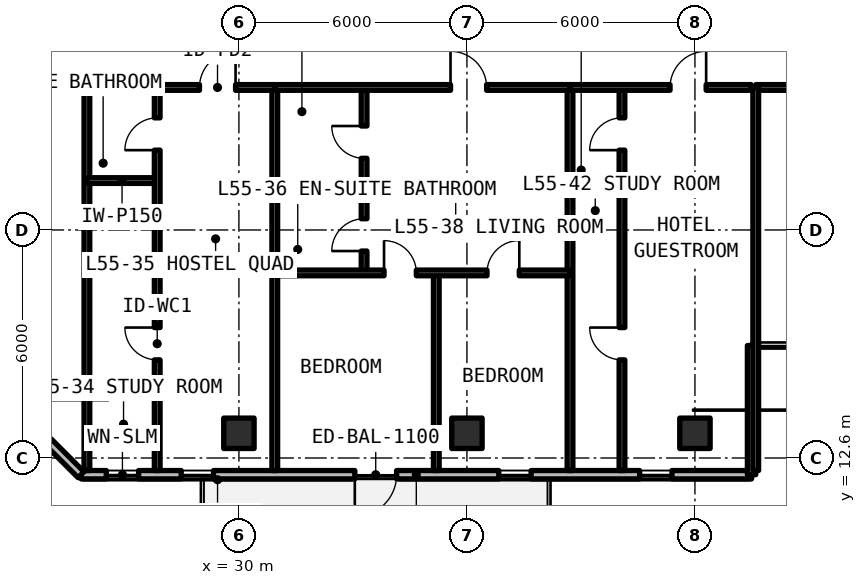
"""IFC4 building model, lengths in metres.
Left out: names, types, materials, properties, quantities, classifications, styles, units other than length and angle.
Written with IfcOpenShell. Run it as: python <this file> out.ifc"""

import sys

from ifc_helpers import new_model, si_unit, direction, frame, frame_2d, origin, origin_2d, place, context, subcontext, project, spatial, rectangle, extrude, element, fill, save


model = new_model("IFC4")
c1 = context("Model", 3, precision=1e-05, world=origin(), true_north=direction((0.0, 1.0)))
c2 = subcontext(c1, "Body", "Model", "MODEL_VIEW")
j1 = project(units=[si_unit("LENGTHUNIT", "METRE"), si_unit("PLANEANGLEUNIT", "RADIAN")], contexts=[c1])
p1 = place(None, origin())
s1 = spatial("IfcSite", under=j1, at=p1, CompositionType="ELEMENT")
p2 = place(p1, origin())
s2 = spatial("IfcBuilding", under=s1, at=p2, CompositionType="ELEMENT")
p3 = place(p2, frame((0.0, 0.0, 198.33)))
s3 = spatial("IfcBuildingStorey", under=s2, at=p3, CompositionType="ELEMENT", Elevation=198.33)
for number, where, z_axis, x_axis in (
    (1, (30.0, 13.25, 0.0), (0.0, 0.0, 1.0), (1.0, 0.0, 0.0)),
    (2, (36.0, 13.25, 0.0), (0.0, 0.0, 1.0), (1.0, 0.0, 0.0)),
    (3, (42.0, 13.25, 0.0), (0.0, 0.0, 1.0), (1.0, 0.0, 0.0)),
):
    element("IfcColumn", number, at=place(p3, frame(where, z_axis=z_axis, x_axis=x_axis)), inside=s3, PredefinedType="COLUMN", context=c2, shape_type="SweptSolid", body=[
        extrude(rectangle(XDim=0.8, YDim=0.8, at=origin_2d()), origin(), (0.0, 0.0, 1.0), 3.3),
    ])
p4 = place(p3, frame((25.846, 12.16, 0.0), z_axis=(0.0, 0.0, 1.0), x_axis=(1.0, 0.0, 0.0)))
e4 = element("IfcWall", 4, at=p4, inside=s3, PredefinedType="SOLIDWALL", context=c2, shape_type="SweptSolid", body=[
    extrude(rectangle(XDim=17.644, YDim=0.22, at=frame_2d((8.822, 0.0))), origin(), (0.0, 0.0, 1.0), 3.08),
])
p5 = place(p4, frame((7.204, 0.0, 0.0)))
e5 = element("IfcOpeningElement", 5, at=p5, cuts=e4, PredefinedType="OPENING", context=c2, shape_type="SweptSolid", body=[
    extrude(rectangle(XDim=1.1, YDim=2.15, at=frame_2d((0.55, 1.075))), frame((0.0, 0.12, 0.0), z_axis=(0.0, -1.0, 0.0), x_axis=(1.0, 0.0, 0.0)), (0.0, 0.0, 1.0), 0.24),
])
p6 = place(p4, frame((0.664, 0.0, 0.78)))
e6 = element("IfcOpeningElement", 6, at=p6, cuts=e4, PredefinedType="OPENING", context=c2, shape_type="SweptSolid", body=[
    extrude(rectangle(XDim=0.85, YDim=1.65, at=frame_2d((0.425, 0.825))), frame((0.0, 0.12, 0.0), z_axis=(0.0, -1.0, 0.0), x_axis=(1.0, 0.0, 0.0)), (0.0, 0.0, 1.0), 0.24),
])
p7 = place(p4, frame((2.636, 0.0, 0.78)))
e7 = element("IfcOpeningElement", 7, at=p7, cuts=e4, PredefinedType="OPENING", context=c2, shape_type="SweptSolid", body=[
    extrude(rectangle(XDim=0.85, YDim=1.65, at=frame_2d((0.425, 0.825))), frame((0.0, 0.12, 0.0), z_axis=(0.0, -1.0, 0.0), x_axis=(1.0, 0.0, 0.0)), (0.0, 0.0, 1.0), 0.24),
])
p8 = place(p4, frame((10.993, 0.0, 0.78)))
e8 = element("IfcOpeningElement", 8, at=p8, cuts=e4, PredefinedType="OPENING", context=c2, shape_type="SweptSolid", body=[
    extrude(rectangle(XDim=0.85, YDim=1.65, at=frame_2d((0.425, 0.825))), frame((0.0, 0.12, 0.0), z_axis=(0.0, -1.0, 0.0), x_axis=(1.0, 0.0, 0.0)), (0.0, 0.0, 1.0), 0.24),
])
p9 = place(p4, frame((14.699, 0.0, 0.78)))
e9 = element("IfcOpeningElement", 9, at=p9, cuts=e4, PredefinedType="OPENING", context=c2, shape_type="SweptSolid", body=[
    extrude(rectangle(XDim=0.85, YDim=1.65, at=frame_2d((0.425, 0.825))), frame((0.0, 0.12, 0.0), z_axis=(0.0, -1.0, 0.0), x_axis=(1.0, 0.0, 0.0)), (0.0, 0.0, 1.0), 0.24),
])
p10 = place(p3, frame((43.49, 12.16, 0.0), z_axis=(0.0, 0.0, 1.0), x_axis=(0.0, 1.0, 0.0)))
e10 = element("IfcWall", 10, at=p10, inside=s3, PredefinedType="SOLIDWALL", context=c2, shape_type="SweptSolid", body=[
    extrude(rectangle(XDim=3.4, YDim=0.22, at=frame_2d((1.7, 0.0))), origin(), (0.0, 0.0, 1.0), 3.08),
])
p11 = place(p3, frame((21.71, 16.296, 0.0), z_axis=(0.0, 0.0, 1.0), x_axis=(0.707106781187, -0.707106781187, 0.0)))
e11 = element("IfcWall", 11, at=p11, inside=s3, PredefinedType="SOLIDWALL", context=c2, shape_type="SweptSolid", body=[
    extrude(rectangle(XDim=5.849, YDim=0.22, at=frame_2d((2.924, 0.0))), origin(), (0.0, 0.0, 1.0), 3.08),
])
p12 = place(p11, frame((1.224, 0.0, 0.78)))
e12 = element("IfcOpeningElement", 12, at=p12, cuts=e11, PredefinedType="OPENING", context=c2, shape_type="SweptSolid", body=[
    extrude(rectangle(XDim=3.4, YDim=1.66, at=frame_2d((1.7, 0.83))), frame((0.0, 0.12, 0.0), z_axis=(0.0, -1.0, 0.0), x_axis=(1.0, 0.0, 0.0)), (0.0, 0.0, 1.0), 0.24),
])
p13 = place(p3, frame((43.6, 22.35, 0.0), z_axis=(0.0, 0.0, 1.0), x_axis=(1.0, 0.0, 0.0)))
e13 = element("IfcWall", 13, at=p13, inside=s3, PredefinedType="SOLIDWALL", context=c2, shape_type="SweptSolid", body=[
    extrude(rectangle(XDim=8.4, YDim=0.15, at=frame_2d((4.2, 0.0))), origin(), (0.0, 0.0, 1.0), 2.35),
])
p14 = place(p13, frame((3.65, 0.0, 0.0)))
e14 = element("IfcOpeningElement", 14, at=p14, cuts=e13, PredefinedType="OPENING", context=c2, shape_type="SweptSolid", body=[
    extrude(rectangle(XDim=1.1, YDim=2.15, at=frame_2d((0.55, 1.075))), frame((0.0, 0.085, 0.0), z_axis=(0.0, -1.0, 0.0), x_axis=(1.0, 0.0, 0.0)), (0.0, 0.0, 1.0), 0.17),
])
for number, where, z_axis, x_axis in (
    (15, (43.6, 12.27, 0.0), (0.0, 0.0, 1.0), (0.0, 1.0, 0.0)),
    (16, (26.0, 12.27, 0.0), (0.0, 0.0, 1.0), (0.0, 1.0, 0.0)),
    (17, (30.944, 12.27, 0.0), (0.0, 0.0, 1.0), (0.0, 1.0, 0.0)),
):
    element("IfcWall", number, at=place(p3, frame(where, z_axis=z_axis, x_axis=x_axis)), inside=s3, PredefinedType="SOLIDWALL", context=c2, shape_type="SweptSolid", body=[
        extrude(rectangle(XDim=10.08, YDim=0.15, at=frame_2d((5.04, 0.0))), origin(), (0.0, 0.0, 1.0), 2.35),
    ])
p15 = place(p3, frame((26.0, 19.9, 0.0), z_axis=(0.0, 0.0, 1.0), x_axis=(1.0, 0.0, 0.0)))
e18 = element("IfcWall", 18, at=p15, inside=s3, PredefinedType="PARTITIONING", context=c2, shape_type="SweptSolid", body=[
    extrude(rectangle(XDim=1.85, YDim=0.15, at=frame_2d((0.925, 0.0))), origin(), (0.0, 0.0, 1.0), 2.35),
])
p16 = place(p3, frame((27.85, 12.27, 0.0), z_axis=(0.0, 0.0, 1.0), x_axis=(0.0, 1.0, 0.0)))
e19 = element("IfcWall", 19, at=p16, inside=s3, PredefinedType="PARTITIONING", context=c2, shape_type="SweptSolid", body=[
    extrude(rectangle(XDim=10.08, YDim=0.15, at=frame_2d((5.04, 0.0))), origin(), (0.0, 0.0, 1.0), 2.35),
])
p17 = place(p16, frame((2.912, 0.0, 0.0)))
e20 = element("IfcOpeningElement", 20, at=p17, cuts=e19, PredefinedType="OPENING", context=c2, shape_type="SweptSolid", body=[
    extrude(rectangle(XDim=0.85, YDim=2.1, at=frame_2d((0.425, 1.05))), frame((0.0, 0.085, 0.0), z_axis=(0.0, -1.0, 0.0), x_axis=(1.0, 0.0, 0.0)), (0.0, 0.0, 1.0), 0.17),
])
p18 = place(p16, frame((8.43, 0.0, 0.0)))
e21 = element("IfcOpeningElement", 21, at=p18, cuts=e19, PredefinedType="OPENING", context=c2, shape_type="SweptSolid", body=[
    extrude(rectangle(XDim=0.85, YDim=2.1, at=frame_2d((0.425, 1.05))), frame((0.0, 0.085, 0.0), z_axis=(0.0, -1.0, 0.0), x_axis=(1.0, 0.0, 0.0)), (0.0, 0.0, 1.0), 0.17),
])
p19 = place(p3, frame((26.0, 22.35, 0.0), z_axis=(0.0, 0.0, 1.0), x_axis=(1.0, 0.0, 0.0)))
e22 = element("IfcWall", 22, at=p19, inside=s3, PredefinedType="SOLIDWALL", context=c2, shape_type="SweptSolid", body=[
    extrude(rectangle(XDim=4.944, YDim=0.15, at=frame_2d((2.472, 0.0))), origin(), (0.0, 0.0, 1.0), 2.35),
])
p20 = place(p19, frame((2.962, 0.0, 0.0)))
e23 = element("IfcOpeningElement", 23, at=p20, cuts=e22, PredefinedType="OPENING", context=c2, shape_type="SweptSolid", body=[
    extrude(rectangle(XDim=0.95, YDim=2.15, at=frame_2d((0.475, 1.075))), frame((0.0, 0.085, 0.0), z_axis=(0.0, -1.0, 0.0), x_axis=(1.0, 0.0, 0.0)), (0.0, 0.0, 1.0), 0.17),
])
p21 = place(p3, frame((38.713, 12.27, 0.0), z_axis=(0.0, 0.0, 1.0), x_axis=(0.0, 1.0, 0.0)))
e24 = element("IfcWall", 24, at=p21, inside=s3, PredefinedType="SOLIDWALL", context=c2, shape_type="SweptSolid", body=[
    extrude(rectangle(XDim=10.08, YDim=0.15, at=frame_2d((5.04, 0.0))), origin(), (0.0, 0.0, 1.0), 2.35),
])
p22 = place(p3, frame((30.944, 19.471, 0.0), z_axis=(0.0, 0.0, 1.0), x_axis=(1.0, 0.0, 0.0)))
e25 = element("IfcWall", 25, at=p22, inside=s3, PredefinedType="PARTITIONING", context=c2, shape_type="SweptSolid", body=[
    extrude(rectangle(XDim=2.35, YDim=0.15, at=frame_2d((1.175, 0.0))), origin(), (0.0, 0.0, 1.0), 2.35),
])
p23 = place(p3, frame((33.294, 17.47, 0.0), z_axis=(0.0, 0.0, 1.0), x_axis=(0.0, 1.0, 0.0)))
e26 = element("IfcWall", 26, at=p23, inside=s3, PredefinedType="PARTITIONING", context=c2, shape_type="SweptSolid", body=[
    extrude(rectangle(XDim=4.88, YDim=0.15, at=frame_2d((2.44, 0.0))), origin(), (0.0, 0.0, 1.0), 2.35),
])
p24 = place(p23, frame((0.575, 0.0, 0.0)))
e27 = element("IfcOpeningElement", 27, at=p24, cuts=e26, PredefinedType="OPENING", context=c2, shape_type="SweptSolid", body=[
    extrude(rectangle(XDim=0.85, YDim=2.1, at=frame_2d((0.425, 1.05))), frame((0.0, 0.085, 0.0), z_axis=(0.0, -1.0, 0.0), x_axis=(1.0, 0.0, 0.0)), (0.0, 0.0, 1.0), 0.17),
])
p25 = place(p23, frame((3.015, 0.0, 0.0)))
e28 = element("IfcOpeningElement", 28, at=p25, cuts=e26, PredefinedType="OPENING", context=c2, shape_type="SweptSolid", body=[
    extrude(rectangle(XDim=0.85, YDim=2.1, at=frame_2d((0.425, 1.05))), frame((0.0, 0.085, 0.0), z_axis=(0.0, -1.0, 0.0), x_axis=(1.0, 0.0, 0.0)), (0.0, 0.0, 1.0), 0.17),
])
p26 = place(p3, frame((35.194, 12.27, 0.0), z_axis=(0.0, 0.0, 1.0), x_axis=(0.0, 1.0, 0.0)))
e29 = element("IfcWall", 29, at=p26, inside=s3, PredefinedType="PARTITIONING", context=c2, shape_type="SweptSolid", body=[
    extrude(rectangle(XDim=5.2, YDim=0.15, at=frame_2d((2.6, 0.0))), origin(), (0.0, 0.0, 1.0), 2.35),
])
p27 = place(p3, frame((30.944, 17.47, 0.0), z_axis=(0.0, 0.0, 1.0), x_axis=(1.0, 0.0, 0.0)))
e30 = element("IfcWall", 30, at=p27, inside=s3, PredefinedType="PARTITIONING", context=c2, shape_type="SweptSolid", body=[
    extrude(rectangle(XDim=7.769, YDim=0.15, at=frame_2d((3.884, 0.0))), origin(), (0.0, 0.0, 1.0), 2.35),
])
p28 = place(p27, frame((2.875, 0.0, 0.0)))
e31 = element("IfcOpeningElement", 31, at=p28, cuts=e30, PredefinedType="OPENING", context=c2, shape_type="SweptSolid", body=[
    extrude(rectangle(XDim=0.85, YDim=2.1, at=frame_2d((0.425, 1.05))), frame((0.0, 0.085, 0.0), z_axis=(0.0, -1.0, 0.0), x_axis=(1.0, 0.0, 0.0)), (0.0, 0.0, 1.0), 0.17),
])
p29 = place(p27, frame((5.584, 0.0, 0.0)))
e32 = element("IfcOpeningElement", 32, at=p29, cuts=e30, PredefinedType="OPENING", context=c2, shape_type="SweptSolid", body=[
    extrude(rectangle(XDim=0.85, YDim=2.1, at=frame_2d((0.425, 1.05))), frame((0.0, 0.085, 0.0), z_axis=(0.0, -1.0, 0.0), x_axis=(1.0, 0.0, 0.0)), (0.0, 0.0, 1.0), 0.17),
])
p30 = place(p3, frame((30.944, 22.35, 0.0), z_axis=(0.0, 0.0, 1.0), x_axis=(1.0, 0.0, 0.0)))
e33 = element("IfcWall", 33, at=p30, inside=s3, PredefinedType="SOLIDWALL", context=c2, shape_type="SweptSolid", body=[
    extrude(rectangle(XDim=7.769, YDim=0.15, at=frame_2d((3.884, 0.0))), origin(), (0.0, 0.0, 1.0), 2.35),
])
p31 = place(p30, frame((4.625, 0.0, 0.0)))
e34 = element("IfcOpeningElement", 34, at=p31, cuts=e33, PredefinedType="OPENING", context=c2, shape_type="SweptSolid", body=[
    extrude(rectangle(XDim=0.95, YDim=2.15, at=frame_2d((0.475, 1.075))), frame((0.0, 0.085, 0.0), z_axis=(0.0, -1.0, 0.0), x_axis=(1.0, 0.0, 0.0)), (0.0, 0.0, 1.0), 0.17),
])
p32 = place(p3, frame((38.713, 19.9, 0.0), z_axis=(0.0, 0.0, 1.0), x_axis=(1.0, 0.0, 0.0)))
e35 = element("IfcWall", 35, at=p32, inside=s3, PredefinedType="PARTITIONING", context=c2, shape_type="SweptSolid", body=[
    extrude(rectangle(XDim=1.367, YDim=0.15, at=frame_2d((0.684, 0.0))), origin(), (0.0, 0.0, 1.0), 2.35),
])
p33 = place(p3, frame((40.08, 12.27, 0.0), z_axis=(0.0, 0.0, 1.0), x_axis=(0.0, 1.0, 0.0)))
e36 = element("IfcWall", 36, at=p33, inside=s3, PredefinedType="PARTITIONING", context=c2, shape_type="SweptSolid", body=[
    extrude(rectangle(XDim=10.08, YDim=0.15, at=frame_2d((5.04, 0.0))), origin(), (0.0, 0.0, 1.0), 2.35),
])
p34 = place(p33, frame((2.912, 0.0, 0.0)))
e37 = element("IfcOpeningElement", 37, at=p34, cuts=e36, PredefinedType="OPENING", context=c2, shape_type="SweptSolid", body=[
    extrude(rectangle(XDim=0.85, YDim=2.1, at=frame_2d((0.425, 1.05))), frame((0.0, 0.085, 0.0), z_axis=(0.0, -1.0, 0.0), x_axis=(1.0, 0.0, 0.0)), (0.0, 0.0, 1.0), 0.17),
])
p35 = place(p33, frame((8.43, 0.0, 0.0)))
e38 = element("IfcOpeningElement", 38, at=p35, cuts=e36, PredefinedType="OPENING", context=c2, shape_type="SweptSolid", body=[
    extrude(rectangle(XDim=0.85, YDim=2.1, at=frame_2d((0.425, 1.05))), frame((0.0, 0.085, 0.0), z_axis=(0.0, -1.0, 0.0), x_axis=(1.0, 0.0, 0.0)), (0.0, 0.0, 1.0), 0.17),
])
p36 = place(p3, frame((38.713, 22.35, 0.0), z_axis=(0.0, 0.0, 1.0), x_axis=(1.0, 0.0, 0.0)))
e39 = element("IfcWall", 39, at=p36, inside=s3, PredefinedType="SOLIDWALL", context=c2, shape_type="SweptSolid", body=[
    extrude(rectangle(XDim=4.767, YDim=0.15, at=frame_2d((2.384, 0.0))), origin(), (0.0, 0.0, 1.0), 2.35),
])
p37 = place(p36, frame((2.632, 0.0, 0.0)))
e40 = element("IfcOpeningElement", 40, at=p37, cuts=e39, PredefinedType="OPENING", context=c2, shape_type="SweptSolid", body=[
    extrude(rectangle(XDim=0.95, YDim=2.15, at=frame_2d((0.475, 1.075))), frame((0.0, 0.085, 0.0), z_axis=(0.0, -1.0, 0.0), x_axis=(1.0, 0.0, 0.0)), (0.0, 0.0, 1.0), 0.17),
])
p38 = place(p5, frame((1.1, 0.0, 0.0), z_axis=(0.0, 0.0, 1.0), x_axis=(-1.0, 0.0, 0.0)))
e41 = element("IfcDoor", 41, at=p38, inside=s3, OperationType="SINGLE_SWING_LEFT", PredefinedType="DOOR", context=c2, shape_type="SweptSolid", body=[
    extrude(rectangle(XDim=1.1, YDim=2.15, at=frame_2d((0.55, 1.075))), frame((0.0, 0.025, 0.0), z_axis=(0.0, -1.0, 0.0), x_axis=(1.0, 0.0, 0.0)), (0.0, 0.0, 1.0), 0.05),
])
fill(e5, e41)
p39 = place(p6, origin())
e42 = element("IfcWindow", 42, at=p39, inside=s3, PartitioningType="SINGLE_PANEL", PredefinedType="WINDOW", context=c2, shape_type="SweptSolid", body=[
    extrude(rectangle(XDim=0.85, YDim=1.65, at=frame_2d((0.425, 0.825))), frame((0.0, 0.03, 0.0), z_axis=(0.0, -1.0, 0.0), x_axis=(1.0, 0.0, 0.0)), (0.0, 0.0, 1.0), 0.06),
])
fill(e6, e42)
p40 = place(p7, origin())
e43 = element("IfcWindow", 43, at=p40, inside=s3, PartitioningType="SINGLE_PANEL", PredefinedType="WINDOW", context=c2, shape_type="SweptSolid", body=[
    extrude(rectangle(XDim=0.85, YDim=1.65, at=frame_2d((0.425, 0.825))), frame((0.0, 0.03, 0.0), z_axis=(0.0, -1.0, 0.0), x_axis=(1.0, 0.0, 0.0)), (0.0, 0.0, 1.0), 0.06),
])
fill(e7, e43)
p41 = place(p8, origin())
e44 = element("IfcWindow", 44, at=p41, inside=s3, PartitioningType="SINGLE_PANEL", PredefinedType="WINDOW", context=c2, shape_type="SweptSolid", body=[
    extrude(rectangle(XDim=0.85, YDim=1.65, at=frame_2d((0.425, 0.825))), frame((0.0, 0.03, 0.0), z_axis=(0.0, -1.0, 0.0), x_axis=(1.0, 0.0, 0.0)), (0.0, 0.0, 1.0), 0.06),
])
fill(e8, e44)
p42 = place(p9, origin())
e45 = element("IfcWindow", 45, at=p42, inside=s3, PartitioningType="SINGLE_PANEL", PredefinedType="WINDOW", context=c2, shape_type="SweptSolid", body=[
    extrude(rectangle(XDim=0.85, YDim=1.65, at=frame_2d((0.425, 0.825))), frame((0.0, 0.03, 0.0), z_axis=(0.0, -1.0, 0.0), x_axis=(1.0, 0.0, 0.0)), (0.0, 0.0, 1.0), 0.06),
])
fill(e9, e45)
p43 = place(p17, origin())
e46 = element("IfcDoor", 46, at=p43, inside=s3, OperationType="SINGLE_SWING_RIGHT", PredefinedType="DOOR", context=c2, shape_type="SweptSolid", body=[
    extrude(rectangle(XDim=0.85, YDim=2.1, at=frame_2d((0.425, 1.05))), frame((0.0, 0.025, 0.0), z_axis=(0.0, -1.0, 0.0), x_axis=(1.0, 0.0, 0.0)), (0.0, 0.0, 1.0), 0.05),
])
fill(e20, e46)
p44 = place(p18, origin())
e47 = element("IfcDoor", 47, at=p44, inside=s3, OperationType="SINGLE_SWING_LEFT", PredefinedType="DOOR", context=c2, shape_type="SweptSolid", body=[
    extrude(rectangle(XDim=0.85, YDim=2.1, at=frame_2d((0.425, 1.05))), frame((0.0, 0.025, 0.0), z_axis=(0.0, -1.0, 0.0), x_axis=(1.0, 0.0, 0.0)), (0.0, 0.0, 1.0), 0.05),
])
fill(e21, e47)
p45 = place(p20, origin())
e48 = element("IfcDoor", 48, at=p45, inside=s3, OperationType="SINGLE_SWING_RIGHT", PredefinedType="DOOR", context=c2, shape_type="SweptSolid", body=[
    extrude(rectangle(XDim=0.95, YDim=2.15, at=frame_2d((0.475, 1.075))), frame((0.0, 0.025, 0.0), z_axis=(0.0, -1.0, 0.0), x_axis=(1.0, 0.0, 0.0)), (0.0, 0.0, 1.0), 0.05),
])
fill(e23, e48)
p46 = place(p24, origin())
e49 = element("IfcDoor", 49, at=p46, inside=s3, OperationType="SINGLE_SWING_LEFT", PredefinedType="DOOR", context=c2, shape_type="SweptSolid", body=[
    extrude(rectangle(XDim=0.85, YDim=2.1, at=frame_2d((0.425, 1.05))), frame((0.0, 0.025, 0.0), z_axis=(0.0, -1.0, 0.0), x_axis=(1.0, 0.0, 0.0)), (0.0, 0.0, 1.0), 0.05),
])
fill(e27, e49)
p47 = place(p25, origin())
e50 = element("IfcDoor", 50, at=p47, inside=s3, OperationType="SINGLE_SWING_RIGHT", PredefinedType="DOOR", context=c2, shape_type="SweptSolid", body=[
    extrude(rectangle(XDim=0.85, YDim=2.1, at=frame_2d((0.425, 1.05))), frame((0.0, 0.025, 0.0), z_axis=(0.0, -1.0, 0.0), x_axis=(1.0, 0.0, 0.0)), (0.0, 0.0, 1.0), 0.05),
])
fill(e28, e50)
p48 = place(p28, origin())
e51 = element("IfcDoor", 51, at=p48, inside=s3, OperationType="SINGLE_SWING_LEFT", PredefinedType="DOOR", context=c2, shape_type="SweptSolid", body=[
    extrude(rectangle(XDim=0.85, YDim=2.1, at=frame_2d((0.425, 1.05))), frame((0.0, 0.025, 0.0), z_axis=(0.0, -1.0, 0.0), x_axis=(1.0, 0.0, 0.0)), (0.0, 0.0, 1.0), 0.05),
])
fill(e31, e51)
p49 = place(p29, origin())
e52 = element("IfcDoor", 52, at=p49, inside=s3, OperationType="SINGLE_SWING_RIGHT", PredefinedType="DOOR", context=c2, shape_type="SweptSolid", body=[
    extrude(rectangle(XDim=0.85, YDim=2.1, at=frame_2d((0.425, 1.05))), frame((0.0, 0.025, 0.0), z_axis=(0.0, -1.0, 0.0), x_axis=(1.0, 0.0, 0.0)), (0.0, 0.0, 1.0), 0.05),
])
fill(e32, e52)
p50 = place(p31, origin())
e53 = element("IfcDoor", 53, at=p50, inside=s3, OperationType="SINGLE_SWING_LEFT", PredefinedType="DOOR", context=c2, shape_type="SweptSolid", body=[
    extrude(rectangle(XDim=0.95, YDim=2.15, at=frame_2d((0.475, 1.075))), frame((0.0, 0.025, 0.0), z_axis=(0.0, -1.0, 0.0), x_axis=(1.0, 0.0, 0.0)), (0.0, 0.0, 1.0), 0.05),
])
fill(e34, e53)
p51 = place(p34, origin())
e54 = element("IfcDoor", 54, at=p51, inside=s3, OperationType="SINGLE_SWING_RIGHT", PredefinedType="DOOR", context=c2, shape_type="SweptSolid", body=[
    extrude(rectangle(XDim=0.85, YDim=2.1, at=frame_2d((0.425, 1.05))), frame((0.0, 0.025, 0.0), z_axis=(0.0, -1.0, 0.0), x_axis=(1.0, 0.0, 0.0)), (0.0, 0.0, 1.0), 0.05),
])
fill(e37, e54)
p52 = place(p35, origin())
e55 = element("IfcDoor", 55, at=p52, inside=s3, OperationType="SINGLE_SWING_LEFT", PredefinedType="DOOR", context=c2, shape_type="SweptSolid", body=[
    extrude(rectangle(XDim=0.85, YDim=2.1, at=frame_2d((0.425, 1.05))), frame((0.0, 0.025, 0.0), z_axis=(0.0, -1.0, 0.0), x_axis=(1.0, 0.0, 0.0)), (0.0, 0.0, 1.0), 0.05),
])
fill(e38, e55)
p53 = place(p37, origin())
e56 = element("IfcDoor", 56, at=p53, inside=s3, OperationType="SINGLE_SWING_RIGHT", PredefinedType="DOOR", context=c2, shape_type="SweptSolid", body=[
    extrude(rectangle(XDim=0.95, YDim=2.15, at=frame_2d((0.475, 1.075))), frame((0.0, 0.025, 0.0), z_axis=(0.0, -1.0, 0.0), x_axis=(1.0, 0.0, 0.0)), (0.0, 0.0, 1.0), 0.05),
])
fill(e40, e56)
save(model, sys.argv[1])
